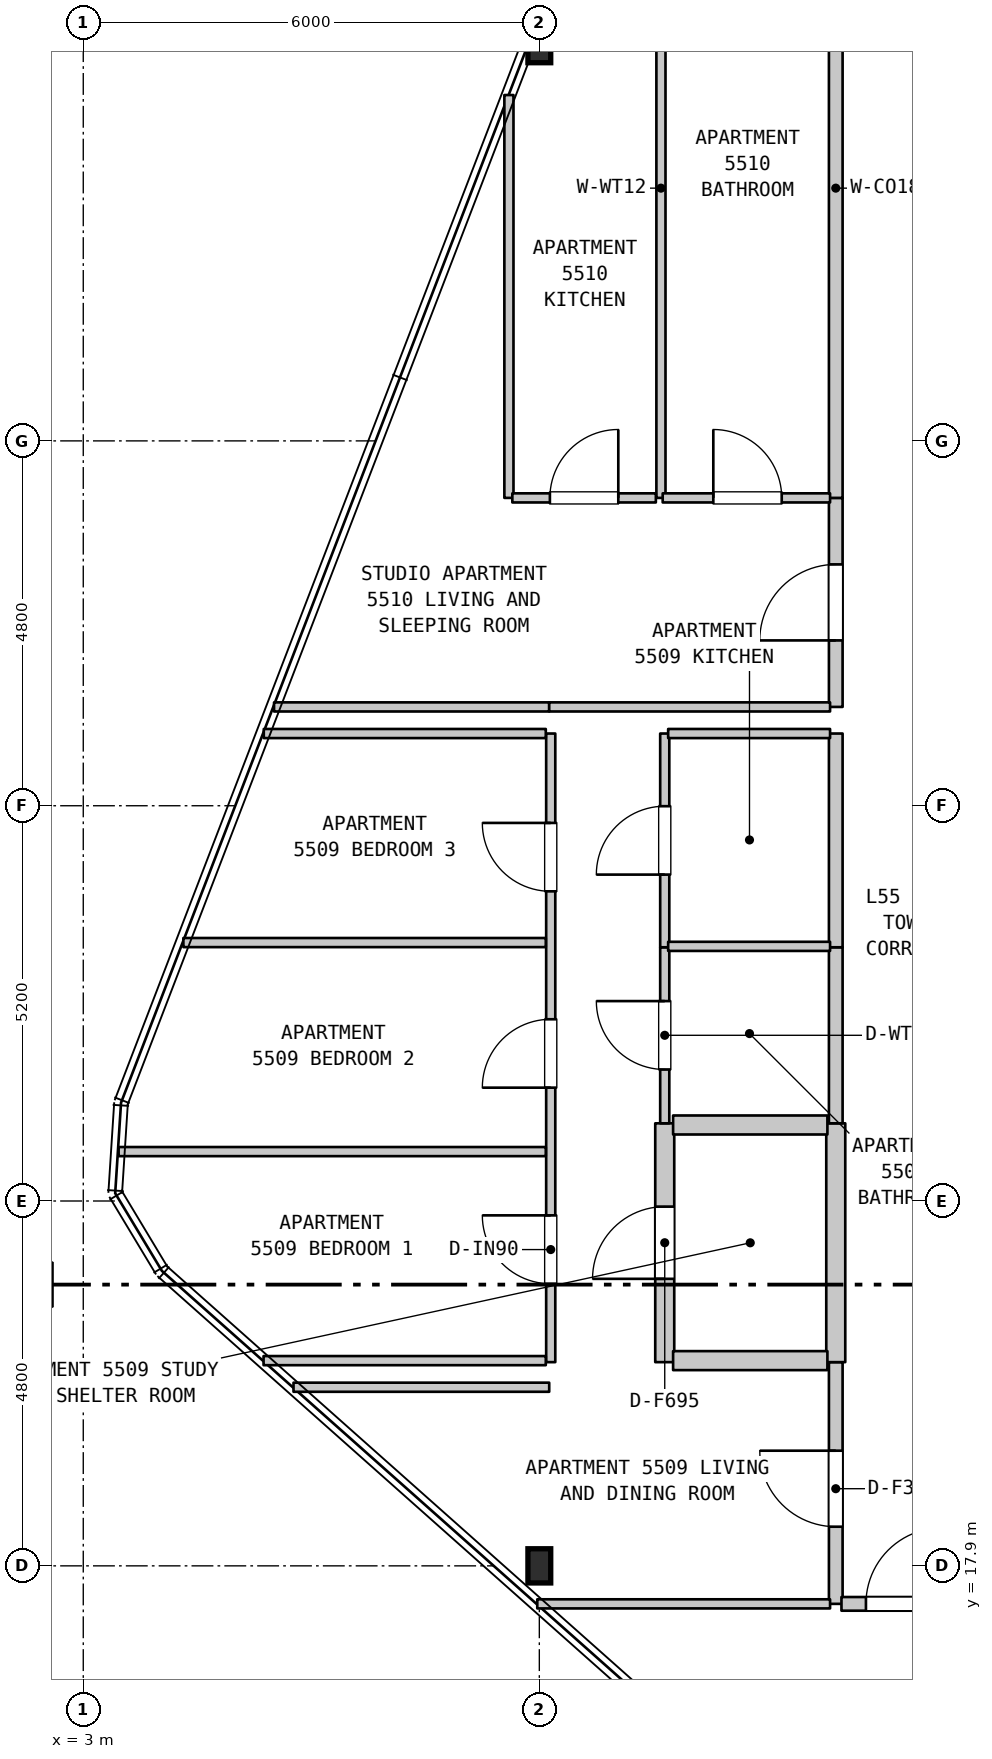
"""IFC4 building model, lengths in metres.
Left out: names, types, materials, properties, quantities, classifications, styles, units other than length and angle.
Written with IfcOpenShell. Run it as: python <this file> out.ifc"""

import sys

from ifc_helpers import new_model, si_unit, direction, frame, frame_2d, origin, origin_2d, place, context, subcontext, project, spatial, rectangle, i_section, extrude, element, fill, save


model = new_model("IFC4")
c1 = context("Model", 3, precision=1e-05, world=origin(), true_north=direction((0.0, 1.0)))
c2 = subcontext(c1, "Body", "Model", "MODEL_VIEW")
j1 = project(units=[si_unit("LENGTHUNIT", "METRE"), si_unit("PLANEANGLEUNIT", "RADIAN")], contexts=[c1])
p1 = place(None, origin())
s1 = spatial("IfcSite", under=j1, at=p1, CompositionType="ELEMENT")
p2 = place(p1, origin())
s2 = spatial("IfcBuilding", under=s1, at=p2, CompositionType="ELEMENT")
p3 = place(p2, frame((0.0, 0.0, 222.8)))
s3 = spatial("IfcBuildingStorey", under=s2, at=p3, CompositionType="ELEMENT", Elevation=222.8)
for number, where, z_axis, x_axis in (
    (1, (9.0, 17.9, 0.0), (0.0, 0.0, 1.0), (1.0, 0.0, 0.0)),
    (2, (9.0, 37.9, 0.0), (0.0, 0.0, 1.0), (1.0, 0.0, 0.0)),
):
    element("IfcColumn", number, at=place(p3, frame(where, z_axis=z_axis, x_axis=x_axis)), inside=s3, PredefinedType="COLUMN", context=c2, shape_type="SweptSolid", body=[
        extrude(i_section(OverallWidth=0.3, OverallDepth=0.45, WebThickness=0.014, FlangeThickness=0.026, FilletRadius=0.027, at=origin_2d()), origin(), (0.0, 0.0, 1.0), 3.7),
    ])
p4 = place(p3, frame((8.6, 31.95, 0.0), z_axis=(0.0, 0.0, 1.0), x_axis=(0.0, 1.0, 0.0)))
e3 = element("IfcWall", 3, at=p4, inside=s3, PredefinedType="PARTITIONING", context=c2, shape_type="SweptSolid", body=[
    extrude(rectangle(XDim=5.3, YDim=0.12, at=frame_2d((2.65, 0.0))), origin(), (0.0, 0.0, 1.0), 3.39),
])
p5 = place(p3, frame((9.15, 20.58, 0.0), z_axis=(0.0, 0.0, 1.0), x_axis=(0.0, 1.0, 0.0)))
e4 = element("IfcWall", 4, at=p5, inside=s3, PredefinedType="PARTITIONING", context=c2, shape_type="SweptSolid", body=[
    extrude(rectangle(XDim=8.27, YDim=0.12, at=frame_2d((4.135, 0.0))), origin(), (0.0, 0.0, 1.0), 2.79),
])
p6 = place(p5, frame((1.031, 0.0, 0.0)))
e5 = element("IfcOpeningElement", 5, at=p6, cuts=e4, PredefinedType="OPENING", context=c2, shape_type="SweptSolid", body=[
    extrude(rectangle(XDim=0.9, YDim=2.15, at=frame_2d((0.45, 1.075))), frame((0.0, 0.07, 0.0), z_axis=(0.0, -1.0, 0.0), x_axis=(1.0, 0.0, 0.0)), (0.0, 0.0, 1.0), 0.14),
])
p7 = place(p5, frame((3.611, 0.0, 0.0)))
e6 = element("IfcOpeningElement", 6, at=p7, cuts=e4, PredefinedType="OPENING", context=c2, shape_type="SweptSolid", body=[
    extrude(rectangle(XDim=0.9, YDim=2.15, at=frame_2d((0.45, 1.075))), frame((0.0, 0.07, 0.0), z_axis=(0.0, -1.0, 0.0), x_axis=(1.0, 0.0, 0.0)), (0.0, 0.0, 1.0), 0.14),
])
p8 = place(p5, frame((6.194, 0.0, 0.0)))
e7 = element("IfcOpeningElement", 7, at=p8, cuts=e4, PredefinedType="OPENING", context=c2, shape_type="SweptSolid", body=[
    extrude(rectangle(XDim=0.9, YDim=2.15, at=frame_2d((0.45, 1.075))), frame((0.0, 0.07, 0.0), z_axis=(0.0, -1.0, 0.0), x_axis=(1.0, 0.0, 0.0)), (0.0, 0.0, 1.0), 0.14),
])
p9 = place(p3, frame((10.6, 31.95, 0.0), z_axis=(0.0, 0.0, 1.0), x_axis=(0.0, 1.0, 0.0)))
e8 = element("IfcWall", 8, at=p9, inside=s3, PredefinedType="PARTITIONING", context=c2, shape_type="SweptSolid", body=[
    extrude(rectangle(XDim=8.15, YDim=0.12, at=frame_2d((4.075, 0.0))), origin(), (0.0, 0.0, 1.0), 3.39),
])
p10 = place(p3, frame((10.65, 20.58, 0.0), z_axis=(0.0, 0.0, 1.0), x_axis=(0.0, 1.0, 0.0)))
e9 = element("IfcWall", 9, at=p10, inside=s3, PredefinedType="STANDARD", context=c2, shape_type="SweptSolid", body=[
    extrude(rectangle(XDim=3.142, YDim=0.25, at=frame_2d((1.571, 0.0))), origin(), (0.0, 0.0, 1.0), 3.39),
])
p11 = place(p10, frame((1.096, 0.0, 0.0)))
e10 = element("IfcOpeningElement", 10, at=p11, cuts=e9, PredefinedType="OPENING", context=c2, shape_type="SweptSolid", body=[
    extrude(rectangle(XDim=0.95, YDim=2.15, at=frame_2d((0.475, 1.075))), frame((0.0, 0.135, 0.0), z_axis=(0.0, -1.0, 0.0), x_axis=(1.0, 0.0, 0.0)), (0.0, 0.0, 1.0), 0.27),
])
p12 = place(p3, frame((10.65, 23.722, 0.0), z_axis=(0.0, 0.0, 1.0), x_axis=(0.0, 1.0, 0.0)))
e11 = element("IfcWall", 11, at=p12, inside=s3, PredefinedType="PARTITIONING", context=c2, shape_type="SweptSolid", body=[
    extrude(rectangle(XDim=2.316, YDim=0.12, at=frame_2d((1.158, 0.0))), origin(), (0.0, 0.0, 1.0), 3.39),
])
p13 = place(p12, frame((0.708, 0.0, 0.0)))
e12 = element("IfcOpeningElement", 12, at=p13, cuts=e11, PredefinedType="OPENING", context=c2, shape_type="SweptSolid", body=[
    extrude(rectangle(XDim=0.9, YDim=2.1, at=frame_2d((0.45, 1.05))), frame((0.0, 0.07, 0.0), z_axis=(0.0, -1.0, 0.0), x_axis=(1.0, 0.0, 0.0)), (0.0, 0.0, 1.0), 0.14),
])
p14 = place(p3, frame((10.65, 26.038, 0.0), z_axis=(0.0, 0.0, 1.0), x_axis=(0.0, 1.0, 0.0)))
e13 = element("IfcWall", 13, at=p14, inside=s3, PredefinedType="PARTITIONING", context=c2, shape_type="SweptSolid", body=[
    extrude(rectangle(XDim=2.812, YDim=0.12, at=frame_2d((1.406, 0.0))), origin(), (0.0, 0.0, 1.0), 3.39),
])
p15 = place(p14, frame((0.956, 0.0, 0.0)))
e14 = element("IfcOpeningElement", 14, at=p15, cuts=e13, PredefinedType="OPENING", context=c2, shape_type="SweptSolid", body=[
    extrude(rectangle(XDim=0.9, YDim=2.15, at=frame_2d((0.45, 1.075))), frame((0.0, 0.07, 0.0), z_axis=(0.0, -1.0, 0.0), x_axis=(1.0, 0.0, 0.0)), (0.0, 0.0, 1.0), 0.14),
])
p16 = place(p3, frame((12.9, 17.4, 0.0), z_axis=(0.0, 0.0, 1.0), x_axis=(0.0, 1.0, 0.0)))
e15 = element("IfcWall", 15, at=p16, inside=s3, PredefinedType="STANDARD", context=c2, shape_type="SweptSolid", body=[
    extrude(rectangle(XDim=3.18, YDim=0.18, at=frame_2d((1.59, 0.0))), origin(), (0.0, 0.0, 1.0), 3.39),
])
p17 = place(p16, frame((1.015, 0.0, 0.0)))
e16 = element("IfcOpeningElement", 16, at=p17, cuts=e15, PredefinedType="OPENING", context=c2, shape_type="SweptSolid", body=[
    extrude(rectangle(XDim=1.0, YDim=2.15, at=frame_2d((0.5, 1.075))), frame((0.0, 0.1, 0.0), z_axis=(0.0, -1.0, 0.0), x_axis=(1.0, 0.0, 0.0)), (0.0, 0.0, 1.0), 0.2),
])
p18 = place(p3, frame((12.9, 20.58, 0.0), z_axis=(0.0, 0.0, 1.0), x_axis=(0.0, 1.0, 0.0)))
e17 = element("IfcWall", 17, at=p18, inside=s3, PredefinedType="STANDARD", context=c2, shape_type="SweptSolid", body=[
    extrude(rectangle(XDim=3.142, YDim=0.25, at=frame_2d((1.571, 0.0))), origin(), (0.0, 0.0, 1.0), 3.39),
])
p19 = place(p3, frame((12.9, 23.722, 0.0), z_axis=(0.0, 0.0, 1.0), x_axis=(0.0, 1.0, 0.0)))
e18 = element("IfcWall", 18, at=p19, inside=s3, PredefinedType="STANDARD", context=c2, shape_type="SweptSolid", body=[
    extrude(rectangle(XDim=2.316, YDim=0.18, at=frame_2d((1.158, 0.0))), origin(), (0.0, 0.0, 1.0), 3.39),
])
p20 = place(p3, frame((12.9, 26.038, 0.0), z_axis=(0.0, 0.0, 1.0), x_axis=(0.0, 1.0, 0.0)))
e19 = element("IfcWall", 19, at=p20, inside=s3, PredefinedType="STANDARD", context=c2, shape_type="SweptSolid", body=[
    extrude(rectangle(XDim=2.812, YDim=0.18, at=frame_2d((1.406, 0.0))), origin(), (0.0, 0.0, 1.0), 3.39),
])
p21 = place(p3, frame((12.9, 29.2, 0.0), z_axis=(0.0, 0.0, 1.0), x_axis=(0.0, 1.0, 0.0)))
e20 = element("IfcWall", 20, at=p21, inside=s3, PredefinedType="STANDARD", context=c2, shape_type="SweptSolid", body=[
    extrude(rectangle(XDim=2.75, YDim=0.18, at=frame_2d((1.375, 0.0))), origin(), (0.0, 0.0, 1.0), 3.39),
])
p22 = place(p21, frame((0.875, 0.0, 0.0)))
e21 = element("IfcOpeningElement", 21, at=p22, cuts=e20, PredefinedType="OPENING", context=c2, shape_type="SweptSolid", body=[
    extrude(rectangle(XDim=1.0, YDim=2.15, at=frame_2d((0.5, 1.075))), frame((0.0, 0.1, 0.0), z_axis=(0.0, -1.0, 0.0), x_axis=(1.0, 0.0, 0.0)), (0.0, 0.0, 1.0), 0.2),
])
p23 = place(p3, frame((12.9, 31.95, 0.0), z_axis=(0.0, 0.0, 1.0), x_axis=(0.0, 1.0, 0.0)))
e22 = element("IfcWall", 22, at=p23, inside=s3, PredefinedType="STANDARD", context=c2, shape_type="SweptSolid", body=[
    extrude(rectangle(XDim=8.15, YDim=0.18, at=frame_2d((4.075, 0.0))), origin(), (0.0, 0.0, 1.0), 3.39),
])
p24 = place(p3, frame((8.973, 17.4, 0.0), z_axis=(0.0, 0.0, 1.0), x_axis=(1.0, 0.0, 0.0)))
e23 = element("IfcWall", 23, at=p24, inside=s3, PredefinedType="PARTITIONING", context=c2, shape_type="SweptSolid", body=[
    extrude(rectangle(XDim=3.852, YDim=0.12, at=frame_2d((1.926, 0.0))), origin(), (0.0, 0.0, 1.0), 3.39),
])
p25 = place(p3, frame((12.975, 17.4, 0.0), z_axis=(0.0, 0.0, 1.0), x_axis=(1.0, 0.0, 0.0)))
e24 = element("IfcWall", 24, at=p25, inside=s3, PredefinedType="STANDARD", context=c2, shape_type="SweptSolid", body=[
    extrude(rectangle(XDim=3.68, YDim=0.18, at=frame_2d((1.84, 0.0))), origin(), (0.0, 0.0, 1.0), 3.39),
])
p26 = place(p25, frame((0.322, 0.0, 0.0)))
e25 = element("IfcOpeningElement", 25, at=p26, cuts=e24, PredefinedType="OPENING", context=c2, shape_type="SweptSolid", body=[
    extrude(rectangle(XDim=1.0, YDim=2.15, at=frame_2d((0.5, 1.075))), frame((0.0, 0.1, 0.0), z_axis=(0.0, -1.0, 0.0), x_axis=(1.0, 0.0, 0.0)), (0.0, 0.0, 1.0), 0.2),
])
p27 = place(p3, frame((5.766, 20.25, 0.0), z_axis=(0.0, 0.0, 1.0), x_axis=(1.0, 0.0, 0.0)))
e26 = element("IfcWall", 26, at=p27, inside=s3, PredefinedType="PARTITIONING", context=c2, shape_type="SweptSolid", body=[
    extrude(rectangle(XDim=3.364, YDim=0.12, at=frame_2d((1.682, 0.0))), origin(), (0.0, 0.0, 1.0), 3.39),
])
p28 = place(p3, frame((5.372, 20.6, 0.0), z_axis=(0.0, 0.0, 1.0), x_axis=(1.0, 0.0, 0.0)))
e27 = element("IfcWall", 27, at=p28, inside=s3, PredefinedType="PARTITIONING", context=c2, shape_type="SweptSolid", body=[
    extrude(rectangle(XDim=3.713, YDim=0.12, at=frame_2d((1.856, 0.0))), origin(), (0.0, 0.0, 1.0), 3.39),
])
p29 = place(p3, frame((10.76, 20.6, 0.0), z_axis=(0.0, 0.0, 1.0), x_axis=(1.0, 0.0, 0.0)))
e28 = element("IfcWall", 28, at=p29, inside=s3, PredefinedType="STANDARD", context=c2, shape_type="SweptSolid", body=[
    extrude(rectangle(XDim=2.03, YDim=0.25, at=frame_2d((1.015, 0.0))), origin(), (0.0, 0.0, 1.0), 3.39),
])
p30 = place(p3, frame((3.465, 23.35, 0.0), z_axis=(0.0, 0.0, 1.0), x_axis=(1.0, 0.0, 0.0)))
e29 = element("IfcWall", 29, at=p30, inside=s3, PredefinedType="PARTITIONING", context=c2, shape_type="SweptSolid", body=[
    extrude(rectangle(XDim=5.62, YDim=0.12, at=frame_2d((2.81, 0.0))), origin(), (0.0, 0.0, 1.0), 3.39),
])
p31 = place(p3, frame((10.76, 23.7, 0.0), z_axis=(0.0, 0.0, 1.0), x_axis=(1.0, 0.0, 0.0)))
e30 = element("IfcWall", 30, at=p31, inside=s3, PredefinedType="STANDARD", context=c2, shape_type="SweptSolid", body=[
    extrude(rectangle(XDim=2.03, YDim=0.25, at=frame_2d((1.015, 0.0))), origin(), (0.0, 0.0, 1.0), 3.39),
])
p32 = place(p3, frame((10.695, 26.05, 0.0), z_axis=(0.0, 0.0, 1.0), x_axis=(1.0, 0.0, 0.0)))
e31 = element("IfcWall", 31, at=p32, inside=s3, PredefinedType="PARTITIONING", context=c2, shape_type="SweptSolid", body=[
    extrude(rectangle(XDim=2.13, YDim=0.12, at=frame_2d((1.065, 0.0))), origin(), (0.0, 0.0, 1.0), 3.39),
])
p33 = place(p3, frame((4.317, 26.1, 0.0), z_axis=(0.0, 0.0, 1.0), x_axis=(1.0, 0.0, 0.0)))
e32 = element("IfcWall", 32, at=p33, inside=s3, PredefinedType="PARTITIONING", context=c2, shape_type="SweptSolid", body=[
    extrude(rectangle(XDim=4.768, YDim=0.12, at=frame_2d((2.384, 0.0))), origin(), (0.0, 0.0, 1.0), 3.39),
])
p34 = place(p3, frame((5.375, 28.85, 0.0), z_axis=(0.0, 0.0, 1.0), x_axis=(1.0, 0.0, 0.0)))
e33 = element("IfcWall", 33, at=p34, inside=s3, PredefinedType="PARTITIONING", context=c2, shape_type="SweptSolid", body=[
    extrude(rectangle(XDim=3.71, YDim=0.12, at=frame_2d((1.855, 0.0))), origin(), (0.0, 0.0, 1.0), 3.39),
])
p35 = place(p3, frame((10.695, 28.85, 0.0), z_axis=(0.0, 0.0, 1.0), x_axis=(1.0, 0.0, 0.0)))
e34 = element("IfcWall", 34, at=p35, inside=s3, PredefinedType="PARTITIONING", context=c2, shape_type="SweptSolid", body=[
    extrude(rectangle(XDim=2.13, YDim=0.12, at=frame_2d((1.065, 0.0))), origin(), (0.0, 0.0, 1.0), 3.39),
])
p36 = place(p3, frame((5.51, 29.2, 0.0), z_axis=(0.0, 0.0, 1.0), x_axis=(1.0, 0.0, 0.0)))
e35 = element("IfcWall", 35, at=p36, inside=s3, PredefinedType="PARTITIONING", context=c2, shape_type="SweptSolid", body=[
    extrude(rectangle(XDim=3.62, YDim=0.12, at=frame_2d((1.81, 0.0))), origin(), (0.0, 0.0, 1.0), 3.39),
])
p37 = place(p3, frame((9.13, 29.2, 0.0), z_axis=(0.0, 0.0, 1.0), x_axis=(1.0, 0.0, 0.0)))
e36 = element("IfcWall", 36, at=p37, inside=s3, PredefinedType="PARTITIONING", context=c2, shape_type="SweptSolid", body=[
    extrude(rectangle(XDim=3.695, YDim=0.12, at=frame_2d((1.848, 0.0))), origin(), (0.0, 0.0, 1.0), 3.39),
])
p38 = place(p3, frame((8.645, 31.95, 0.0), z_axis=(0.0, 0.0, 1.0), x_axis=(1.0, 0.0, 0.0)))
e37 = element("IfcWall", 37, at=p38, inside=s3, PredefinedType="PARTITIONING", context=c2, shape_type="SweptSolid", body=[
    extrude(rectangle(XDim=1.888, YDim=0.12, at=frame_2d((0.944, 0.0))), origin(), (0.0, 0.0, 1.0), 3.39),
])
p39 = place(p38, frame((0.494, 0.0, 0.0)))
e38 = element("IfcOpeningElement", 38, at=p39, cuts=e37, PredefinedType="OPENING", context=c2, shape_type="SweptSolid", body=[
    extrude(rectangle(XDim=0.9, YDim=2.15, at=frame_2d((0.45, 1.075))), frame((0.0, 0.07, 0.0), z_axis=(0.0, -1.0, 0.0), x_axis=(1.0, 0.0, 0.0)), (0.0, 0.0, 1.0), 0.14),
])
p40 = place(p3, frame((10.623, 31.95, 0.0), z_axis=(0.0, 0.0, 1.0), x_axis=(1.0, 0.0, 0.0)))
e39 = element("IfcWall", 39, at=p40, inside=s3, PredefinedType="PARTITIONING", context=c2, shape_type="SweptSolid", body=[
    extrude(rectangle(XDim=2.202, YDim=0.12, at=frame_2d((1.101, 0.0))), origin(), (0.0, 0.0, 1.0), 3.39),
])
p41 = place(p40, frame((0.666, 0.0, 0.0)))
e40 = element("IfcOpeningElement", 40, at=p41, cuts=e39, PredefinedType="OPENING", context=c2, shape_type="SweptSolid", body=[
    extrude(rectangle(XDim=0.9, YDim=2.1, at=frame_2d((0.45, 1.05))), frame((0.0, 0.07, 0.0), z_axis=(0.0, -1.0, 0.0), x_axis=(1.0, 0.0, 0.0)), (0.0, 0.0, 1.0), 0.14),
])
p42 = place(p6, origin())
e41 = element("IfcDoor", 41, at=p42, inside=s3, OperationType="SINGLE_SWING_RIGHT", PredefinedType="DOOR", context=c2, shape_type="SweptSolid", body=[
    extrude(rectangle(XDim=0.9, YDim=2.15, at=frame_2d((0.45, 1.075))), frame((0.0, 0.025, 0.0), z_axis=(0.0, -1.0, 0.0), x_axis=(1.0, 0.0, 0.0)), (0.0, 0.0, 1.0), 0.05),
])
fill(e5, e41)
p43 = place(p7, origin())
e42 = element("IfcDoor", 42, at=p43, inside=s3, OperationType="SINGLE_SWING_LEFT", PredefinedType="DOOR", context=c2, shape_type="SweptSolid", body=[
    extrude(rectangle(XDim=0.9, YDim=2.15, at=frame_2d((0.45, 1.075))), frame((0.0, 0.025, 0.0), z_axis=(0.0, -1.0, 0.0), x_axis=(1.0, 0.0, 0.0)), (0.0, 0.0, 1.0), 0.05),
])
fill(e6, e42)
p44 = place(p8, origin())
e43 = element("IfcDoor", 43, at=p44, inside=s3, OperationType="SINGLE_SWING_RIGHT", PredefinedType="DOOR", context=c2, shape_type="SweptSolid", body=[
    extrude(rectangle(XDim=0.9, YDim=2.15, at=frame_2d((0.45, 1.075))), frame((0.0, 0.025, 0.0), z_axis=(0.0, -1.0, 0.0), x_axis=(1.0, 0.0, 0.0)), (0.0, 0.0, 1.0), 0.05),
])
fill(e7, e43)
p45 = place(p11, origin())
e44 = element("IfcDoor", 44, at=p45, inside=s3, OperationType="SINGLE_SWING_LEFT", PredefinedType="DOOR", context=c2, shape_type="SweptSolid", body=[
    extrude(rectangle(XDim=0.95, YDim=2.15, at=frame_2d((0.475, 1.075))), frame((0.0, 0.025, 0.0), z_axis=(0.0, -1.0, 0.0), x_axis=(1.0, 0.0, 0.0)), (0.0, 0.0, 1.0), 0.05),
])
fill(e10, e44)
p46 = place(p13, origin())
e45 = element("IfcDoor", 45, at=p46, inside=s3, OperationType="SINGLE_SWING_RIGHT", PredefinedType="DOOR", context=c2, shape_type="SweptSolid", body=[
    extrude(rectangle(XDim=0.9, YDim=2.1, at=frame_2d((0.45, 1.05))), frame((0.0, 0.025, 0.0), z_axis=(0.0, -1.0, 0.0), x_axis=(1.0, 0.0, 0.0)), (0.0, 0.0, 1.0), 0.05),
])
fill(e12, e45)
p47 = place(p15, origin())
e46 = element("IfcDoor", 46, at=p47, inside=s3, OperationType="SINGLE_SWING_LEFT", PredefinedType="DOOR", context=c2, shape_type="SweptSolid", body=[
    extrude(rectangle(XDim=0.9, YDim=2.15, at=frame_2d((0.45, 1.075))), frame((0.0, 0.025, 0.0), z_axis=(0.0, -1.0, 0.0), x_axis=(1.0, 0.0, 0.0)), (0.0, 0.0, 1.0), 0.05),
])
fill(e14, e46)
p48 = place(p17, origin())
e47 = element("IfcDoor", 47, at=p48, inside=s3, OperationType="SINGLE_SWING_RIGHT", PredefinedType="DOOR", context=c2, shape_type="SweptSolid", body=[
    extrude(rectangle(XDim=1.0, YDim=2.15, at=frame_2d((0.5, 1.075))), frame((0.0, 0.025, 0.0), z_axis=(0.0, -1.0, 0.0), x_axis=(1.0, 0.0, 0.0)), (0.0, 0.0, 1.0), 0.05),
])
fill(e16, e47)
p49 = place(p22, origin())
e48 = element("IfcDoor", 48, at=p49, inside=s3, OperationType="SINGLE_SWING_LEFT", PredefinedType="DOOR", context=c2, shape_type="SweptSolid", body=[
    extrude(rectangle(XDim=1.0, YDim=2.15, at=frame_2d((0.5, 1.075))), frame((0.0, 0.025, 0.0), z_axis=(0.0, -1.0, 0.0), x_axis=(1.0, 0.0, 0.0)), (0.0, 0.0, 1.0), 0.05),
])
fill(e21, e48)
p50 = place(p26, origin())
e49 = element("IfcDoor", 49, at=p50, inside=s3, OperationType="SINGLE_SWING_RIGHT", PredefinedType="DOOR", context=c2, shape_type="SweptSolid", body=[
    extrude(rectangle(XDim=1.0, YDim=2.15, at=frame_2d((0.5, 1.075))), frame((0.0, 0.025, 0.0), z_axis=(0.0, -1.0, 0.0), x_axis=(1.0, 0.0, 0.0)), (0.0, 0.0, 1.0), 0.05),
])
fill(e25, e49)
p51 = place(p39, origin())
e50 = element("IfcDoor", 50, at=p51, inside=s3, OperationType="SINGLE_SWING_RIGHT", PredefinedType="DOOR", context=c2, shape_type="SweptSolid", body=[
    extrude(rectangle(XDim=0.9, YDim=2.15, at=frame_2d((0.45, 1.075))), frame((0.0, 0.025, 0.0), z_axis=(0.0, -1.0, 0.0), x_axis=(1.0, 0.0, 0.0)), (0.0, 0.0, 1.0), 0.05),
])
fill(e38, e50)
p52 = place(p41, origin())
e51 = element("IfcDoor", 51, at=p52, inside=s3, OperationType="SINGLE_SWING_LEFT", PredefinedType="DOOR", context=c2, shape_type="SweptSolid", body=[
    extrude(rectangle(XDim=0.9, YDim=2.1, at=frame_2d((0.45, 1.05))), frame((0.0, 0.025, 0.0), z_axis=(0.0, -1.0, 0.0), x_axis=(1.0, 0.0, 0.0)), (0.0, 0.0, 1.0), 0.05),
])
fill(e40, e51)
save(model, sys.argv[1])
